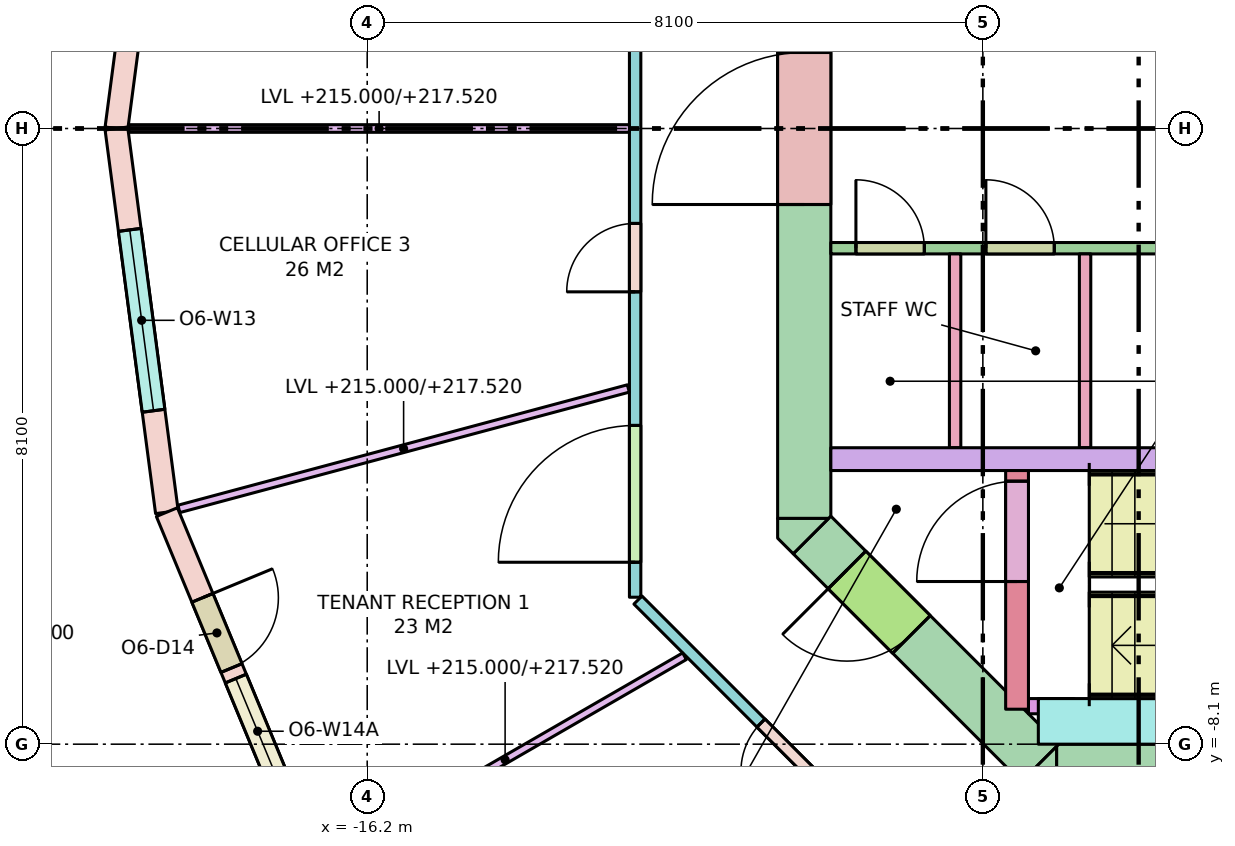
"""IFC4 building model, lengths in metres.
Left out: names, types, materials, properties, quantities, classifications, styles, units other than length and angle.
Written with IfcOpenShell. Run it as: python <this file> out.ifc"""

import sys

from ifc_helpers import new_model, si_unit, direction, frame, frame_2d, origin, place, context, subcontext, project, spatial, polyline, rectangle, outline, extrude, element, fill, save


model = new_model("IFC4")
c1 = context("Model", 3, precision=1e-05, world=origin(), true_north=direction((0.0, 1.0)))
c2 = subcontext(c1, "Body", "Model", "MODEL_VIEW")
j1 = project(units=[si_unit("LENGTHUNIT", "METRE"), si_unit("PLANEANGLEUNIT", "RADIAN")], contexts=[c1])
p1 = place(None, origin())
s1 = spatial("IfcSite", under=j1, at=p1, CompositionType="ELEMENT")
p2 = place(p1, origin())
s2 = spatial("IfcBuilding", under=s1, at=p2, CompositionType="ELEMENT")
p3 = place(p2, frame((0.0, 0.0, 215.0)))
s3 = spatial("IfcBuildingStorey", under=s2, at=p3, CompositionType="ELEMENT", Elevation=215.0)
p4 = place(p3, frame((-7.13, -8.45, -0.28), z_axis=(0.0, 0.0, 1.0), x_axis=(1.0, 0.0, 0.0)))
e1 = element("IfcWall", 1, at=p4, inside=s3, PredefinedType="SHEAR", context=c2, shape_type="SweptSolid", body=[
    extrude(rectangle(XDim=14.26, YDim=0.7, at=frame_2d((7.13, 0.0))), origin(), (0.0, 0.0, 1.0), 3.7),
])
p5 = place(p4, frame((8.08, 0.0, 0.28)))
e2 = element("IfcOpeningElement", 2, at=p5, cuts=e1, PredefinedType="OPENING", context=c2, shape_type="SweptSolid", body=[
    extrude(rectangle(XDim=0.7, YDim=2.1, at=frame_2d((0.35, 1.05))), frame((0.0, 0.36, 0.0), z_axis=(0.0, -1.0, 0.0), x_axis=(1.0, 0.0, 0.0)), (0.0, 0.0, 1.0), 0.72),
])
p6 = place(p4, frame((5.58, 0.0, 0.28)))
e3 = element("IfcOpeningElement", 3, at=p6, cuts=e1, PredefinedType="OPENING", context=c2, shape_type="SweptSolid", body=[
    extrude(rectangle(XDim=0.85, YDim=2.1, at=frame_2d((0.425, 1.05))), frame((0.0, 0.36, 0.0), z_axis=(0.0, -1.0, 0.0), x_axis=(1.0, 0.0, 0.0)), (0.0, 0.0, 1.0), 0.72),
])
p7 = place(p4, frame((6.88, 0.0, 0.28)))
e4 = element("IfcOpeningElement", 4, at=p7, cuts=e1, PredefinedType="OPENING", context=c2, shape_type="SweptSolid", body=[
    extrude(rectangle(XDim=0.85, YDim=2.1, at=frame_2d((0.425, 1.05))), frame((0.0, 0.36, 0.0), z_axis=(0.0, -1.0, 0.0), x_axis=(1.0, 0.0, 0.0)), (0.0, 0.0, 1.0), 0.72),
])
p8 = place(p4, frame((9.521, 0.0, 0.28)))
e5 = element("IfcOpeningElement", 5, at=p8, cuts=e1, PredefinedType="OPENING", context=c2, shape_type="SweptSolid", body=[
    extrude(rectangle(XDim=0.9, YDim=2.1, at=frame_2d((0.45, 1.05))), frame((0.0, 0.36, 0.0), z_axis=(0.0, -1.0, 0.0), x_axis=(1.0, 0.0, 0.0)), (0.0, 0.0, 1.0), 0.72),
])
p9 = place(p4, frame((11.278, 0.0, 0.28)))
e6 = element("IfcOpeningElement", 6, at=p9, cuts=e1, PredefinedType="OPENING", context=c2, shape_type="SweptSolid", body=[
    extrude(rectangle(XDim=0.9, YDim=2.1, at=frame_2d((0.45, 1.05))), frame((0.0, 0.36, 0.0), z_axis=(0.0, -1.0, 0.0), x_axis=(1.0, 0.0, 0.0)), (0.0, 0.0, 1.0), 0.72),
])
p10 = place(p4, frame((12.84, 0.0, 0.28)))
e7 = element("IfcOpeningElement", 7, at=p10, cuts=e1, PredefinedType="OPENING", context=c2, shape_type="SweptSolid", body=[
    extrude(rectangle(XDim=0.9, YDim=2.1, at=frame_2d((0.45, 1.05))), frame((0.0, 0.36, 0.0), z_axis=(0.0, -1.0, 0.0), x_axis=(1.0, 0.0, 0.0)), (0.0, 0.0, 1.0), 0.72),
])
p11 = place(p3, frame((-10.45, -5.13, -0.28), z_axis=(0.0, 0.0, 1.0), x_axis=(0.0, 1.0, 0.0)))
e8 = element("IfcWall", 8, at=p11, inside=s3, PredefinedType="SHEAR", context=c2, shape_type="SweptSolid", body=[
    extrude(rectangle(XDim=10.26, YDim=0.7, at=frame_2d((5.13, 0.0))), origin(), (0.0, 0.0, 1.0), 3.7),
])
p12 = place(p11, frame((4.13, 0.0, 0.28)))
e9 = element("IfcOpeningElement", 9, at=p12, cuts=e8, PredefinedType="OPENING", context=c2, shape_type="SweptSolid", body=[
    extrude(rectangle(XDim=2.0, YDim=2.1, at=frame_2d((1.0, 1.05))), frame((0.0, 0.36, 0.0), z_axis=(0.0, -1.0, 0.0), x_axis=(1.0, 0.0, 0.0)), (0.0, 0.0, 1.0), 0.72),
])
p13 = place(p3, frame((-7.347, -8.347, -0.28), z_axis=(0.0, 0.0, 1.0), x_axis=(-0.707106781187, 0.707106781187, 0.0)))
e10 = element("IfcWall", 10, at=p13, inside=s3, PredefinedType="SHEAR", context=c2, shape_type="SweptSolid", body=[
    extrude(rectangle(XDim=4.243, YDim=0.7, at=frame_2d((2.121, 0.0))), origin(), (0.0, 0.0, 1.0), 3.7),
])
p14 = place(p13, frame((2.393, 0.0, 0.28)))
e11 = element("IfcOpeningElement", 11, at=p14, cuts=e10, PredefinedType="OPENING", context=c2, shape_type="SweptSolid", body=[
    extrude(rectangle(XDim=1.2, YDim=2.1, at=frame_2d((0.6, 1.05))), frame((0.0, 0.36, 0.0), z_axis=(0.0, -1.0, 0.0), x_axis=(1.0, 0.0, 0.0)), (0.0, 0.0, 1.0), 0.72),
])
p15 = place(p3, frame((0.0, 0.0, -0.28)))
e12 = element("IfcWall", 12, at=p15, inside=s3, PredefinedType="SHEAR", context=c2, shape_type="SweptSolid", body=[
    extrude(outline(polyline([(-7.39, -8.8), (-7.595, -8.595), (-7.595, -8.595), (-7.595, -8.595), (-7.13, -8.13), (-7.13, -8.8), (-7.13, -8.8), (-7.39, -8.8)])), origin(), (0.0, 0.0, 1.0), 3.7),
])
p16 = place(p3, frame((0.0, 0.0, -0.28)))
e13 = element("IfcWall", 13, at=p16, inside=s3, PredefinedType="SHEAR", context=c2, shape_type="SweptSolid", body=[
    extrude(outline(polyline([(-10.8, -5.39), (-10.8, -5.13), (-10.8, -5.13), (-10.13, -5.13), (-10.595, -5.595), (-10.595, -5.595), (-10.595, -5.595), (-10.8, -5.39)])), origin(), (0.0, 0.0, 1.0), 3.7),
])
p17 = place(p3, frame((-10.1, -4.35, 0.0), z_axis=(0.0, 0.0, 1.0), x_axis=(1.0, 0.0, 0.0)))
e14 = element("IfcWall", 14, at=p17, inside=s3, PredefinedType="SOLIDWALL", context=c2, shape_type="SweptSolid", body=[
    extrude(rectangle(XDim=8.1, YDim=0.3, at=frame_2d((4.05, 0.0))), origin(), (0.0, 0.0, 1.0), 3.42),
])
p18 = place(p3, frame((-7.65, -7.64, 0.0), z_axis=(0.0, 0.0, 1.0), x_axis=(0.0, 1.0, 0.0)))
e15 = element("IfcWall", 15, at=p18, inside=s3, PredefinedType="SHEAR", context=c2, shape_type="SweptSolid", body=[
    extrude(rectangle(XDim=3.14, YDim=0.3, at=frame_2d((1.57, 0.0))), origin(), (0.0, 0.0, 1.0), 3.42),
])
p19 = place(p18, frame((1.68, 0.0, 0.0)))
e16 = element("IfcOpeningElement", 16, at=p19, cuts=e15, PredefinedType="OPENING", context=c2, shape_type="SweptSolid", body=[
    extrude(rectangle(XDim=1.32, YDim=2.1, at=frame_2d((0.66, 1.05))), frame((0.0, 0.16, 0.0), z_axis=(0.0, -1.0, 0.0), x_axis=(1.0, 0.0, 0.0)), (0.0, 0.0, 1.0), 0.32),
])
p20 = place(p3, frame((-7.5, -7.6, 0.0), z_axis=(0.0, 0.0, 1.0), x_axis=(1.0, 0.0, 0.0)))
e17 = element("IfcWall", 17, at=p20, inside=s3, PredefinedType="SHEAR", context=c2, shape_type="SweptSolid", body=[
    extrude(rectangle(XDim=0.6, YDim=0.2, at=frame_2d((0.3, 0.0))), origin(), (0.0, 0.0, 1.0), 3.42),
])
p21 = place(p3, frame((-7.37, -7.8, 0.0), z_axis=(0.0, 0.0, 1.0), x_axis=(1.0, 0.0, 0.0)))
e18 = element("IfcWall", 18, at=p21, inside=s3, PredefinedType="SHEAR", context=c2, shape_type="SweptSolid", body=[
    extrude(rectangle(XDim=5.37, YDim=0.6, at=frame_2d((2.685, 0.0))), origin(), (0.0, 0.0, 1.0), 3.42),
])
p22 = place(p3, frame((-18.836, 5.047, 0.0), z_axis=(0.0, 0.0, 1.0), x_axis=(-0.130495451964, -0.99144890792, 0.0)))
e19 = element("IfcWall", 19, at=p22, inside=s3, PredefinedType="STANDARD", context=c2, shape_type="SweptSolid", body=[
    extrude(rectangle(XDim=5.091, YDim=0.3, at=frame_2d((2.545, 0.0))), origin(), (0.0, 0.0, 1.0), 3.42),
])
p23 = place(p22, frame((1.22, 0.0, 0.0)))
e20 = element("IfcOpeningElement", 20, at=p23, cuts=e19, PredefinedType="OPENING", context=c2, shape_type="SweptSolid", body=[
    extrude(rectangle(XDim=1.0, YDim=2.4, at=frame_2d((0.5, 1.2))), frame((0.0, 0.16, 0.0), z_axis=(0.0, -1.0, 0.0), x_axis=(1.0, 0.0, 0.0)), (0.0, 0.0, 1.0), 0.32),
])
p24 = place(p22, frame((2.37, 0.0, 0.8)))
e21 = element("IfcOpeningElement", 21, at=p24, cuts=e19, PredefinedType="OPENING", context=c2, shape_type="SweptSolid", body=[
    extrude(rectangle(XDim=1.5, YDim=2.4, at=frame_2d((0.75, 1.2))), frame((0.0, 0.16, 0.0), z_axis=(0.0, -1.0, 0.0), x_axis=(1.0, 0.0, 0.0)), (0.0, 0.0, 1.0), 0.32),
])
p25 = place(p3, frame((-19.5, 0.0, 0.0), z_axis=(0.0, 0.0, 1.0), x_axis=(0.130495451964, -0.99144890792, 0.0)))
e22 = element("IfcWall", 22, at=p25, inside=s3, PredefinedType="STANDARD", context=c2, shape_type="SweptSolid", body=[
    extrude(rectangle(XDim=5.091, YDim=0.3, at=frame_2d((2.545, 0.0))), origin(), (0.0, 0.0, 1.0), 3.42),
])
p26 = place(p25, frame((1.345, 0.0, 0.8)))
e23 = element("IfcOpeningElement", 23, at=p26, cuts=e22, PredefinedType="OPENING", context=c2, shape_type="SweptSolid", body=[
    extrude(rectangle(XDim=2.4, YDim=2.4, at=frame_2d((1.2, 1.2))), frame((0.0, 0.16, 0.0), z_axis=(0.0, -1.0, 0.0), x_axis=(1.0, 0.0, 0.0)), (0.0, 0.0, 1.0), 0.32),
])
p27 = place(p3, frame((-18.836, -5.047, 0.0), z_axis=(0.0, 0.0, 1.0), x_axis=(0.382724538613, -0.923862504675, 0.0)))
e24 = element("IfcWall", 24, at=p27, inside=s3, PredefinedType="STANDARD", context=c2, shape_type="SweptSolid", body=[
    extrude(rectangle(XDim=5.091, YDim=0.3, at=frame_2d((2.545, 0.0))), origin(), (0.0, 0.0, 1.0), 3.42),
])
p28 = place(p27, frame((1.22, 0.0, 0.0)))
e25 = element("IfcOpeningElement", 25, at=p28, cuts=e24, PredefinedType="OPENING", context=c2, shape_type="SweptSolid", body=[
    extrude(rectangle(XDim=1.0, YDim=2.4, at=frame_2d((0.5, 1.2))), frame((0.0, 0.16, 0.0), z_axis=(0.0, -1.0, 0.0), x_axis=(1.0, 0.0, 0.0)), (0.0, 0.0, 1.0), 0.32),
])
p29 = place(p27, frame((2.37, 0.0, 0.8)))
e26 = element("IfcOpeningElement", 26, at=p29, cuts=e24, PredefinedType="OPENING", context=c2, shape_type="SweptSolid", body=[
    extrude(rectangle(XDim=1.5, YDim=2.4, at=frame_2d((0.75, 1.2))), frame((0.0, 0.16, 0.0), z_axis=(0.0, -1.0, 0.0), x_axis=(1.0, 0.0, 0.0)), (0.0, 0.0, 1.0), 0.32),
])
for number, where, z_axis, x_axis in (
    (27, (-8.465, -4.2, 0.0), (0.0, 0.0, 1.0), (0.0, 1.0, 0.0)),
    (28, (-6.755, -4.2, 0.0), (0.0, 0.0, 1.0), (0.0, 1.0, 0.0)),
):
    element("IfcWall", number, at=place(p3, frame(where, z_axis=z_axis, x_axis=x_axis)), inside=s3, PredefinedType="PARTITIONING", context=c2, shape_type="SweptSolid", body=[
        extrude(rectangle(XDim=2.55, YDim=0.15, at=frame_2d((1.275, 0.0))), origin(), (0.0, 0.0, 1.0), 3.42),
    ])
p30 = place(p3, frame((-10.1, -1.575, 0.0), z_axis=(0.0, 0.0, 1.0), x_axis=(1.0, 0.0, 0.0)))
e29 = element("IfcWall", 29, at=p30, inside=s3, PredefinedType="PARTITIONING", context=c2, shape_type="SweptSolid", body=[
    extrude(rectangle(XDim=8.1, YDim=0.15, at=frame_2d((4.05, 0.0))), origin(), (0.0, 0.0, 1.0), 3.42),
])
p31 = place(p30, frame((0.33, 0.0, 0.0)))
e30 = element("IfcOpeningElement", 30, at=p31, cuts=e29, PredefinedType="OPENING", context=c2, shape_type="SweptSolid", body=[
    extrude(rectangle(XDim=0.9, YDim=2.1, at=frame_2d((0.45, 1.05))), frame((0.0, 0.085, 0.0), z_axis=(0.0, -1.0, 0.0), x_axis=(1.0, 0.0, 0.0)), (0.0, 0.0, 1.0), 0.17),
])
p32 = place(p30, frame((2.04, 0.0, 0.0)))
e31 = element("IfcOpeningElement", 31, at=p32, cuts=e29, PredefinedType="OPENING", context=c2, shape_type="SweptSolid", body=[
    extrude(rectangle(XDim=0.9, YDim=2.1, at=frame_2d((0.45, 1.05))), frame((0.0, 0.085, 0.0), z_axis=(0.0, -1.0, 0.0), x_axis=(1.0, 0.0, 0.0)), (0.0, 0.0, 1.0), 0.17),
])
p33 = place(p30, frame((5.31, 0.0, 0.0)))
e32 = element("IfcOpeningElement", 32, at=p33, cuts=e29, PredefinedType="OPENING", context=c2, shape_type="SweptSolid", body=[
    extrude(rectangle(XDim=0.9, YDim=2.1, at=frame_2d((0.45, 1.05))), frame((0.0, 0.085, 0.0), z_axis=(0.0, -1.0, 0.0), x_axis=(1.0, 0.0, 0.0)), (0.0, 0.0, 1.0), 0.17),
])
p34 = place(p3, frame((-9.421, -9.421, 0.0), z_axis=(0.0, 0.0, 1.0), x_axis=(-0.707079950597, 0.707133610758, 0.0)))
e33 = element("IfcWall", 33, at=p34, inside=s3, PredefinedType="PARTITIONING", context=c2, shape_type="SweptSolid", body=[
    extrude(rectangle(XDim=4.55, YDim=0.15, at=frame_2d((2.275, 0.0))), origin(), (0.0, 0.0, 1.0), 2.52),
])
p35 = place(p34, frame((1.361, 0.0, 0.0)))
e34 = element("IfcOpeningElement", 34, at=p35, cuts=e33, PredefinedType="OPENING", context=c2, shape_type="SweptSolid", body=[
    extrude(rectangle(XDim=0.9, YDim=2.1, at=frame_2d((0.45, 1.05))), frame((0.0, 0.085, 0.0), z_axis=(0.0, -1.0, 0.0), x_axis=(1.0, 0.0, 0.0)), (0.0, 0.0, 1.0), 0.17),
])
p36 = place(p3, frame((-12.675, -6.167, 0.0), z_axis=(0.0, 0.0, 1.0), x_axis=(0.0, 1.0, 0.0)))
e35 = element("IfcWall", 35, at=p36, inside=s3, PredefinedType="PARTITIONING", context=c2, shape_type="SweptSolid", body=[
    extrude(rectangle(XDim=12.333, YDim=0.15, at=frame_2d((6.167, 0.0))), origin(), (0.0, 0.0, 1.0), 2.52),
])
p37 = place(p36, frame((10.473, 0.0, 0.0)))
e36 = element("IfcOpeningElement", 36, at=p37, cuts=e35, PredefinedType="OPENING", context=c2, shape_type="SweptSolid", body=[
    extrude(rectangle(XDim=0.9, YDim=2.1, at=frame_2d((0.45, 1.05))), frame((0.0, 0.085, 0.0), z_axis=(0.0, -1.0, 0.0), x_axis=(1.0, 0.0, 0.0)), (0.0, 0.0, 1.0), 0.17),
])
p38 = place(p36, frame((7.416, 0.0, 0.0)))
e37 = element("IfcOpeningElement", 37, at=p38, cuts=e35, PredefinedType="OPENING", context=c2, shape_type="SweptSolid", body=[
    extrude(rectangle(XDim=0.9, YDim=2.1, at=frame_2d((0.45, 1.05))), frame((0.0, 0.085, 0.0), z_axis=(0.0, -1.0, 0.0), x_axis=(1.0, 0.0, 0.0)), (0.0, 0.0, 1.0), 0.17),
])
p39 = place(p36, frame((4.018, 0.0, 0.0)))
e38 = element("IfcOpeningElement", 38, at=p39, cuts=e35, PredefinedType="OPENING", context=c2, shape_type="SweptSolid", body=[
    extrude(rectangle(XDim=0.9, YDim=2.1, at=frame_2d((0.45, 1.05))), frame((0.0, 0.085, 0.0), z_axis=(0.0, -1.0, 0.0), x_axis=(1.0, 0.0, 0.0)), (0.0, 0.0, 1.0), 0.17),
])
p40 = place(p36, frame((0.46, 0.0, 0.0)))
e39 = element("IfcOpeningElement", 39, at=p40, cuts=e35, PredefinedType="OPENING", context=c2, shape_type="SweptSolid", body=[
    extrude(rectangle(XDim=1.8, YDim=2.1, at=frame_2d((0.9, 1.05))), frame((0.0, 0.085, 0.0), z_axis=(0.0, -1.0, 0.0), x_axis=(1.0, 0.0, 0.0)), (0.0, 0.0, 1.0), 0.17),
])
p41 = place(p3, frame((-12.75, 0.0, 0.0), z_axis=(0.0, 0.0, 1.0), x_axis=(-1.0, 0.0, 0.0)))
e40 = element("IfcWall", 40, at=p41, inside=s3, PredefinedType="PARTITIONING", context=c2, shape_type="SweptSolid", body=[
    extrude(rectangle(XDim=6.587, YDim=0.1, at=frame_2d((3.293, 0.0))), origin(), (0.0, 0.0, 1.0), 2.52),
])
p42 = place(p3, frame((-12.764, -3.42, 0.0), z_axis=(0.0, 0.0, 1.0), x_axis=(-0.965925800266, -0.258819142221, 0.0)))
e41 = element("IfcWall", 41, at=p42, inside=s3, PredefinedType="PARTITIONING", context=c2, shape_type="SweptSolid", body=[
    extrude(rectangle(XDim=6.122, YDim=0.1, at=frame_2d((3.061, 0.0))), origin(), (0.0, 0.0, 1.0), 2.52),
])
p43 = place(p3, frame((-12.025, -6.943, 0.0), z_axis=(0.0, 0.0, 1.0), x_axis=(-0.866029712004, -0.499992537871, 0.0)))
e42 = element("IfcWall", 42, at=p43, inside=s3, PredefinedType="PARTITIONING", context=c2, shape_type="SweptSolid", body=[
    extrude(rectangle(XDim=5.451, YDim=0.1, at=frame_2d((2.726, 0.0))), origin(), (0.0, 0.0, 1.0), 2.52),
])
p44 = place(p26, origin())
e43 = element("IfcWindow", 43, at=p44, inside=s3, PartitioningType="SINGLE_PANEL", PredefinedType="WINDOW", context=c2, shape_type="SweptSolid", body=[
    extrude(rectangle(XDim=2.4, YDim=2.4, at=frame_2d((1.2, 1.2))), frame((0.0, 0.03, 0.0), z_axis=(0.0, -1.0, 0.0), x_axis=(1.0, 0.0, 0.0)), (0.0, 0.0, 1.0), 0.06),
])
fill(e23, e43)
p45 = place(p28, origin())
e44 = element("IfcDoor", 44, at=p45, inside=s3, OperationType="SINGLE_SWING_LEFT", PredefinedType="DOOR", context=c2, shape_type="SweptSolid", body=[
    extrude(rectangle(XDim=1.0, YDim=2.4, at=frame_2d((0.5, 1.2))), frame((0.0, 0.025, 0.0), z_axis=(0.0, -1.0, 0.0), x_axis=(1.0, 0.0, 0.0)), (0.0, 0.0, 1.0), 0.05),
])
fill(e25, e44)
p46 = place(p29, origin())
e45 = element("IfcWindow", 45, at=p46, inside=s3, PartitioningType="SINGLE_PANEL", PredefinedType="WINDOW", context=c2, shape_type="SweptSolid", body=[
    extrude(rectangle(XDim=1.5, YDim=2.4, at=frame_2d((0.75, 1.2))), frame((0.0, 0.03, 0.0), z_axis=(0.0, -1.0, 0.0), x_axis=(1.0, 0.0, 0.0)), (0.0, 0.0, 1.0), 0.06),
])
fill(e26, e45)
p47 = place(p19, origin())
e46 = element("IfcDoor", 46, at=p47, inside=s3, OperationType="DOUBLE_DOOR_SINGLE_SWING", PredefinedType="DOOR", context=c2, shape_type="SweptSolid", body=[
    extrude(rectangle(XDim=1.32, YDim=2.1, at=frame_2d((0.66, 1.05))), frame((0.0, 0.025, 0.0), z_axis=(0.0, -1.0, 0.0), x_axis=(1.0, 0.0, 0.0)), (0.0, 0.0, 1.0), 0.05),
])
fill(e16, e46)
p48 = place(p14, origin())
e47 = element("IfcDoor", 47, at=p48, inside=s3, OperationType="SINGLE_SWING_RIGHT", PredefinedType="DOOR", context=c2, shape_type="SweptSolid", body=[
    extrude(rectangle(XDim=1.2, YDim=2.1, at=frame_2d((0.6, 1.05))), frame((0.0, 0.025, 0.0), z_axis=(0.0, -1.0, 0.0), x_axis=(1.0, 0.0, 0.0)), (0.0, 0.0, 1.0), 0.05),
])
fill(e11, e47)
p49 = place(p12, origin())
e48 = element("IfcDoor", 48, at=p49, inside=s3, OperationType="DOUBLE_DOOR_SINGLE_SWING", PredefinedType="DOOR", context=c2, shape_type="SweptSolid", body=[
    extrude(rectangle(XDim=2.0, YDim=2.1, at=frame_2d((1.0, 1.05))), frame((0.0, 0.025, 0.0), z_axis=(0.0, -1.0, 0.0), x_axis=(1.0, 0.0, 0.0)), (0.0, 0.0, 1.0), 0.05),
])
fill(e9, e48)
p50 = place(p31, origin())
e49 = element("IfcDoor", 49, at=p50, inside=s3, OperationType="SINGLE_SWING_LEFT", PredefinedType="DOOR", context=c2, shape_type="SweptSolid", body=[
    extrude(rectangle(XDim=0.9, YDim=2.1, at=frame_2d((0.45, 1.05))), frame((0.0, 0.025, 0.0), z_axis=(0.0, -1.0, 0.0), x_axis=(1.0, 0.0, 0.0)), (0.0, 0.0, 1.0), 0.05),
])
fill(e30, e49)
p51 = place(p32, origin())
e50 = element("IfcDoor", 50, at=p51, inside=s3, OperationType="SINGLE_SWING_LEFT", PredefinedType="DOOR", context=c2, shape_type="SweptSolid", body=[
    extrude(rectangle(XDim=0.9, YDim=2.1, at=frame_2d((0.45, 1.05))), frame((0.0, 0.025, 0.0), z_axis=(0.0, -1.0, 0.0), x_axis=(1.0, 0.0, 0.0)), (0.0, 0.0, 1.0), 0.05),
])
fill(e31, e50)
p52 = place(p39, origin())
e51 = element("IfcDoor", 51, at=p52, inside=s3, OperationType="SINGLE_SWING_LEFT", PredefinedType="DOOR", context=c2, shape_type="SweptSolid", body=[
    extrude(rectangle(XDim=0.9, YDim=2.1, at=frame_2d((0.45, 1.05))), frame((0.0, 0.025, 0.0), z_axis=(0.0, -1.0, 0.0), x_axis=(1.0, 0.0, 0.0)), (0.0, 0.0, 1.0), 0.05),
])
fill(e38, e51)
p53 = place(p40, origin())
e52 = element("IfcDoor", 52, at=p53, inside=s3, OperationType="DOUBLE_DOOR_SINGLE_SWING", PredefinedType="DOOR", context=c2, shape_type="SweptSolid", body=[
    extrude(rectangle(XDim=1.8, YDim=2.1, at=frame_2d((0.9, 1.05))), frame((0.0, 0.025, 0.0), z_axis=(0.0, -1.0, 0.0), x_axis=(1.0, 0.0, 0.0)), (0.0, 0.0, 1.0), 0.05),
])
fill(e39, e52)
p54 = place(p35, origin())
e53 = element("IfcDoor", 53, at=p54, inside=s3, OperationType="SINGLE_SWING_LEFT", PredefinedType="DOOR", context=c2, shape_type="SweptSolid", body=[
    extrude(rectangle(XDim=0.9, YDim=2.1, at=frame_2d((0.45, 1.05))), frame((0.0, 0.025, 0.0), z_axis=(0.0, -1.0, 0.0), x_axis=(1.0, 0.0, 0.0)), (0.0, 0.0, 1.0), 0.05),
])
fill(e34, e53)
save(model, sys.argv[1])
